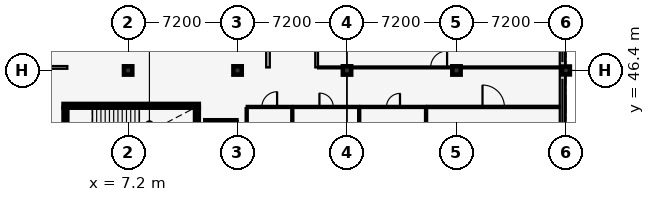
"""IFC4 building model, lengths in metres.
Left out: names, types, materials, properties, quantities, classifications, styles, units other than length and angle.
Written with IfcOpenShell. Run it as: python <this file> out.ifc"""

import sys

from ifc_helpers import new_model, si_unit, direction, frame, frame_2d, origin, origin_2d, place, context, subcontext, project, spatial, rectangle, extrude, element, fill, save


model = new_model("IFC4")
c1 = context("Model", 3, precision=1e-05, world=origin(), true_north=direction((0.0, 1.0)))
c2 = subcontext(c1, "Body", "Model", "MODEL_VIEW")
j1 = project(units=[si_unit("LENGTHUNIT", "METRE"), si_unit("PLANEANGLEUNIT", "RADIAN")], contexts=[c1])
p1 = place(None, origin())
s1 = spatial("IfcSite", under=j1, at=p1, CompositionType="ELEMENT")
p2 = place(p1, origin())
s2 = spatial("IfcBuilding", under=s1, at=p2, CompositionType="ELEMENT")
p3 = place(p2, frame((0.0, 0.0, 5.4)))
s3 = spatial("IfcBuildingStorey", under=s2, at=p3, CompositionType="ELEMENT", Elevation=5.4)
for number, where, z_axis, x_axis in (
    (1, (7.2, 46.4, 0.0), (0.0, 0.0, 1.0), (1.0, 0.0, 0.0)),
    (2, (14.4, 46.4, 0.0), (0.0, 0.0, 1.0), (1.0, 0.0, 0.0)),
    (3, (21.6, 46.4, 0.0), (0.0, 0.0, 1.0), (1.0, 0.0, 0.0)),
    (4, (28.8, 46.4, 0.0), (0.0, 0.0, 1.0), (1.0, 0.0, 0.0)),
):
    element("IfcColumn", number, at=place(p3, frame(where, z_axis=z_axis, x_axis=x_axis)), inside=s3, PredefinedType="COLUMN", context=c2, shape_type="SweptSolid", body=[
        extrude(rectangle(XDim=0.55, YDim=0.55, at=origin_2d()), origin(), (0.0, 0.0, 1.0), 4.2),
    ])
p4 = place(p3, frame((36.0, 46.4, 0.0), z_axis=(0.0, 0.0, 1.0), x_axis=(1.0, 0.0, 0.0)))
e5 = element("IfcColumn", 5, at=p4, inside=s3, PredefinedType="COLUMN", context=c2, shape_type="SweptSolid", body=[
    extrude(rectangle(XDim=0.52, YDim=0.52, at=origin_2d()), origin(), (0.0, 0.0, 1.0), 4.2),
])
p5 = place(p3, frame((35.77, 68.0, 0.0), z_axis=(0.0, 0.0, 1.0), x_axis=(0.0, -1.0, 0.0)))
e6 = element("IfcWall", 6, at=p5, inside=s3, PredefinedType="SOLIDWALL", context=c2, shape_type="SweptSolid", body=[
    extrude(rectangle(XDim=28.8, YDim=0.35, at=frame_2d((14.4, 0.0))), origin(), (0.0, 0.0, 1.0), 0.85),
])
p6 = place(p3, frame((11.85, 44.075, 0.0), z_axis=(0.0, 0.0, 1.0), x_axis=(-1.0, 0.0, 0.0)))
e7 = element("IfcWall", 7, at=p6, inside=s3, PredefinedType="SHEAR", context=c2, shape_type="SweptSolid", body=[
    extrude(rectangle(XDim=8.9, YDim=0.25, at=frame_2d((4.45, 0.0))), origin(), (0.0, 0.0, 1.0), 3.94),
])
p7 = place(p3, frame((3.075, 43.95, 0.0), z_axis=(0.0, 0.0, 1.0), x_axis=(0.0, -1.0, 0.0)))
e8 = element("IfcWall", 8, at=p7, inside=s3, PredefinedType="SHEAR", context=c2, shape_type="SweptSolid", body=[
    extrude(rectangle(XDim=3.55, YDim=0.25, at=frame_2d((1.775, 0.0))), origin(), (0.0, 0.0, 1.0), 3.94),
])
p8 = place(p7, frame((1.15, 0.0, 0.0)))
e9 = element("IfcOpeningElement", 9, at=p8, cuts=e8, PredefinedType="OPENING", context=c2, shape_type="SweptSolid", body=[
    extrude(rectangle(XDim=1.25, YDim=2.15, at=frame_2d((0.625, 1.075))), frame((0.0, 0.137, 0.0), z_axis=(0.0, -1.0, 0.0), x_axis=(1.0, 0.0, 0.0)), (0.0, 0.0, 1.0), 0.274),
])
p9 = place(p3, frame((11.725, 40.4, 0.0), z_axis=(0.0, 0.0, 1.0), x_axis=(0.0, 1.0, 0.0)))
e10 = element("IfcWall", 10, at=p9, inside=s3, PredefinedType="SHEAR", context=c2, shape_type="SweptSolid", body=[
    extrude(rectangle(XDim=3.55, YDim=0.25, at=frame_2d((1.775, 0.0))), origin(), (0.0, 0.0, 1.0), 3.94),
])
p10 = place(p3, frame((14.325, 43.0, 0.0), z_axis=(0.0, 0.0, 1.0), x_axis=(-1.0, 0.0, 0.0)))
e11 = element("IfcWall", 11, at=p10, inside=s3, PredefinedType="SHEAR", context=c2, shape_type="SweptSolid", body=[
    extrude(rectangle(XDim=2.05, YDim=0.25, at=frame_2d((1.025, 0.0))), origin(), (0.0, 0.0, 1.0), 3.94),
])
p11 = place(p10, frame((0.55, 0.0, 0.0)))
e12 = element("IfcOpeningElement", 12, at=p11, cuts=e11, PredefinedType="OPENING", context=c2, shape_type="SweptSolid", body=[
    extrude(rectangle(XDim=0.95, YDim=2.1, at=frame_2d((0.475, 1.05))), frame((0.0, 0.137, 0.0), z_axis=(0.0, -1.0, 0.0), x_axis=(1.0, 0.0, 0.0)), (0.0, 0.0, 1.0), 0.274),
])
p12 = place(p3, frame((0.47, 46.6, 0.0), z_axis=(0.0, 0.0, 1.0), x_axis=(1.0, 0.0, 0.0)))
e13 = element("IfcWall", 13, at=p12, inside=s3, PredefinedType="PARTITIONING", context=c2, shape_type="SweptSolid", body=[
    extrude(rectangle(XDim=2.73, YDim=0.18, at=frame_2d((1.365, 0.0))), origin(), (0.0, 0.0, 1.0), 3.265),
])
p13 = place(p3, frame((19.6, 46.6, 0.0), z_axis=(0.0, 0.0, 1.0), x_axis=(0.0, 1.0, 0.0)))
e14 = element("IfcWall", 14, at=p13, inside=s3, PredefinedType="PARTITIONING", context=c2, shape_type="SweptSolid", body=[
    extrude(rectangle(XDim=20.93, YDim=0.18, at=frame_2d((10.465, 0.0))), origin(), (0.0, 0.0, 1.0), 3.94),
])
p14 = place(p13, frame((15.145, 0.0, 0.0)))
e15 = element("IfcOpeningElement", 15, at=p14, cuts=e14, PredefinedType="OPENING", context=c2, shape_type="SweptSolid", body=[
    extrude(rectangle(XDim=1.04, YDim=2.15, at=frame_2d((0.52, 1.075))), frame((0.0, 0.102, 0.0), z_axis=(0.0, -1.0, 0.0), x_axis=(1.0, 0.0, 0.0)), (0.0, 0.0, 1.0), 0.204),
])
p15 = place(p3, frame((16.4, 46.6, 0.0), z_axis=(0.0, 0.0, 1.0), x_axis=(0.0, 1.0, 0.0)))
e16 = element("IfcWall", 16, at=p15, inside=s3, PredefinedType="PARTITIONING", context=c2, shape_type="SweptSolid", body=[
    extrude(rectangle(XDim=10.27, YDim=0.24, at=frame_2d((5.135, 0.0))), origin(), (0.0, 0.0, 1.0), 3.94),
])
p16 = place(p3, frame((19.7, 46.6, 0.0), z_axis=(0.0, 0.0, 1.0), x_axis=(1.0, 0.0, 0.0)))
e17 = element("IfcWall", 17, at=p16, inside=s3, PredefinedType="PARTITIONING", context=c2, shape_type="SweptSolid", body=[
    extrude(rectangle(XDim=15.885, YDim=0.125, at=frame_2d((7.942, 0.0))), origin(), (0.0, 0.0, 1.0), 3.065),
])
p17 = place(p16, frame((7.403, 0.0, 0.0)))
e18 = element("IfcOpeningElement", 18, at=p17, cuts=e17, PredefinedType="OPENING", context=c2, shape_type="SweptSolid", body=[
    extrude(rectangle(XDim=1.08, YDim=2.15, at=frame_2d((0.54, 1.075))), frame((0.0, 0.074, 0.0), z_axis=(0.0, -1.0, 0.0), x_axis=(1.0, 0.0, 0.0)), (0.0, 0.0, 1.0), 0.149),
])
p18 = place(p3, frame((15.0, 44.0, 0.0), z_axis=(0.0, 0.0, 1.0), x_axis=(1.0, 0.0, 0.0)))
e19 = element("IfcWall", 19, at=p18, inside=s3, PredefinedType="PARTITIONING", context=c2, shape_type="SweptSolid", body=[
    extrude(rectangle(XDim=3.0, YDim=0.14, at=frame_2d((1.5, 0.0))), origin(), (0.0, 0.0, 1.0), 3.94),
])
p19 = place(p18, frame((1.0, 0.0, 0.0)))
e20 = element("IfcOpeningElement", 20, at=p19, cuts=e19, PredefinedType="OPENING", context=c2, shape_type="SweptSolid", body=[
    extrude(rectangle(XDim=1.0, YDim=2.1, at=frame_2d((0.5, 1.05))), frame((0.0, 0.082, 0.0), z_axis=(0.0, -1.0, 0.0), x_axis=(1.0, 0.0, 0.0)), (0.0, 0.0, 1.0), 0.164),
])
p20 = place(p3, frame((15.0, 39.67, 0.0), z_axis=(0.0, 0.0, 1.0), x_axis=(0.0, 1.0, 0.0)))
e21 = element("IfcWall", 21, at=p20, inside=s3, PredefinedType="PARTITIONING", context=c2, shape_type="SweptSolid", body=[
    extrude(rectangle(XDim=4.25, YDim=0.14, at=frame_2d((2.125, 0.0))), origin(), (0.0, 0.0, 1.0), 3.94),
])
p21 = place(p3, frame((18.0, 39.67, 0.0), z_axis=(0.0, 0.0, 1.0), x_axis=(0.0, 1.0, 0.0)))
e22 = element("IfcWall", 22, at=p21, inside=s3, PredefinedType="PARTITIONING", context=c2, shape_type="SweptSolid", body=[
    extrude(rectangle(XDim=4.25, YDim=0.14, at=frame_2d((2.125, 0.0))), origin(), (0.0, 0.0, 1.0), 3.695),
])
p22 = place(p3, frame((18.08, 44.0, 0.0), z_axis=(0.0, 0.0, 1.0), x_axis=(1.0, 0.0, 0.0)))
e23 = element("IfcWall", 23, at=p22, inside=s3, PredefinedType="PARTITIONING", context=c2, shape_type="SweptSolid", body=[
    extrude(rectangle(XDim=4.32, YDim=0.14, at=frame_2d((2.16, 0.0))), origin(), (0.0, 0.0, 1.0), 3.94),
])
p23 = place(p22, frame((1.705, 0.0, 0.0)))
e24 = element("IfcOpeningElement", 24, at=p23, cuts=e23, PredefinedType="OPENING", context=c2, shape_type="SweptSolid", body=[
    extrude(rectangle(XDim=0.91, YDim=2.06, at=frame_2d((0.455, 1.03))), frame((0.0, 0.082, 0.0), z_axis=(0.0, -1.0, 0.0), x_axis=(1.0, 0.0, 0.0)), (0.0, 0.0, 1.0), 0.164),
])
p24 = place(p3, frame((22.4, 39.67, 0.0), z_axis=(0.0, 0.0, 1.0), x_axis=(0.0, 1.0, 0.0)))
e25 = element("IfcWall", 25, at=p24, inside=s3, PredefinedType="PARTITIONING", context=c2, shape_type="SweptSolid", body=[
    extrude(rectangle(XDim=4.25, YDim=0.14, at=frame_2d((2.125, 0.0))), origin(), (0.0, 0.0, 1.0), 3.94),
])
p25 = place(p3, frame((22.48, 44.0, 0.0), z_axis=(0.0, 0.0, 1.0), x_axis=(1.0, 0.0, 0.0)))
e26 = element("IfcWall", 26, at=p25, inside=s3, PredefinedType="PARTITIONING", context=c2, shape_type="SweptSolid", body=[
    extrude(rectangle(XDim=4.32, YDim=0.14, at=frame_2d((2.16, 0.0))), origin(), (0.0, 0.0, 1.0), 3.94),
])
p26 = place(p25, frame((1.715, 0.0, 0.0)))
e27 = element("IfcOpeningElement", 27, at=p26, cuts=e26, PredefinedType="OPENING", context=c2, shape_type="SweptSolid", body=[
    extrude(rectangle(XDim=0.89, YDim=2.05, at=frame_2d((0.445, 1.025))), frame((0.0, 0.082, 0.0), z_axis=(0.0, -1.0, 0.0), x_axis=(1.0, 0.0, 0.0)), (0.0, 0.0, 1.0), 0.164),
])
p27 = place(p3, frame((26.8, 39.67, 0.0), z_axis=(0.0, 0.0, 1.0), x_axis=(0.0, 1.0, 0.0)))
e28 = element("IfcWall", 28, at=p27, inside=s3, PredefinedType="PARTITIONING", context=c2, shape_type="SweptSolid", body=[
    extrude(rectangle(XDim=4.25, YDim=0.14, at=frame_2d((2.125, 0.0))), origin(), (0.0, 0.0, 1.0), 3.94),
])
p28 = place(p3, frame((26.88, 44.0, 0.0), z_axis=(0.0, 0.0, 1.0), x_axis=(1.0, 0.0, 0.0)))
e29 = element("IfcWall", 29, at=p28, inside=s3, PredefinedType="PARTITIONING", context=c2, shape_type="SweptSolid", body=[
    extrude(rectangle(XDim=8.705, YDim=0.15, at=frame_2d((4.353, 0.0))), origin(), (0.0, 0.0, 1.0), 3.94),
])
p29 = place(p28, frame((3.633, 0.0, 0.0)))
e30 = element("IfcOpeningElement", 30, at=p29, cuts=e29, PredefinedType="OPENING", context=c2, shape_type="SweptSolid", body=[
    extrude(rectangle(XDim=1.44, YDim=2.2, at=frame_2d((0.72, 1.1))), frame((0.0, 0.087, 0.0), z_axis=(0.0, -1.0, 0.0), x_axis=(1.0, 0.0, 0.0)), (0.0, 0.0, 1.0), 0.174),
])
p30 = place(p11, origin())
e31 = element("IfcDoor", 31, at=p30, inside=s3, OperationType="SLIDING_TO_LEFT", PredefinedType="DOOR", context=c2, shape_type="SweptSolid", body=[
    extrude(rectangle(XDim=0.95, YDim=2.1, at=frame_2d((0.475, 1.05))), frame((0.0, 0.025, 0.0), z_axis=(0.0, -1.0, 0.0), x_axis=(1.0, 0.0, 0.0)), (0.0, 0.0, 1.0), 0.05),
])
fill(e12, e31)
p31 = place(p17, origin())
e32 = element("IfcDoor", 32, at=p31, inside=s3, OperationType="SINGLE_SWING_RIGHT", PredefinedType="DOOR", context=c2, shape_type="SweptSolid", body=[
    extrude(rectangle(XDim=1.08, YDim=2.15, at=frame_2d((0.54, 1.075))), frame((0.0, 0.025, 0.0), z_axis=(0.0, -1.0, 0.0), x_axis=(1.0, 0.0, 0.0)), (0.0, 0.0, 1.0), 0.05),
])
fill(e18, e32)
p32 = place(p19, origin())
e33 = element("IfcDoor", 33, at=p32, inside=s3, OperationType="SINGLE_SWING_RIGHT", PredefinedType="DOOR", context=c2, shape_type="SweptSolid", body=[
    extrude(rectangle(XDim=1.0, YDim=2.1, at=frame_2d((0.5, 1.05))), frame((0.0, 0.025, 0.0), z_axis=(0.0, -1.0, 0.0), x_axis=(1.0, 0.0, 0.0)), (0.0, 0.0, 1.0), 0.05),
])
fill(e20, e33)
p33 = place(p23, origin())
e34 = element("IfcDoor", 34, at=p33, inside=s3, OperationType="SINGLE_SWING_LEFT", PredefinedType="DOOR", context=c2, shape_type="SweptSolid", body=[
    extrude(rectangle(XDim=0.91, YDim=2.06, at=frame_2d((0.455, 1.03))), frame((0.0, 0.025, 0.0), z_axis=(0.0, -1.0, 0.0), x_axis=(1.0, 0.0, 0.0)), (0.0, 0.0, 1.0), 0.05),
])
fill(e24, e34)
p34 = place(p26, origin())
e35 = element("IfcDoor", 35, at=p34, inside=s3, OperationType="SINGLE_SWING_RIGHT", PredefinedType="DOOR", context=c2, shape_type="SweptSolid", body=[
    extrude(rectangle(XDim=0.89, YDim=2.05, at=frame_2d((0.445, 1.025))), frame((0.0, 0.025, 0.0), z_axis=(0.0, -1.0, 0.0), x_axis=(1.0, 0.0, 0.0)), (0.0, 0.0, 1.0), 0.05),
])
fill(e27, e35)
p35 = place(p29, origin())
e36 = element("IfcDoor", 36, at=p35, inside=s3, OperationType="SINGLE_SWING_LEFT", PredefinedType="DOOR", context=c2, shape_type="SweptSolid", body=[
    extrude(rectangle(XDim=1.44, YDim=2.2, at=frame_2d((0.72, 1.1))), frame((0.0, 0.025, 0.0), z_axis=(0.0, -1.0, 0.0), x_axis=(1.0, 0.0, 0.0)), (0.0, 0.0, 1.0), 0.05),
])
fill(e30, e36)
save(model, sys.argv[1])
